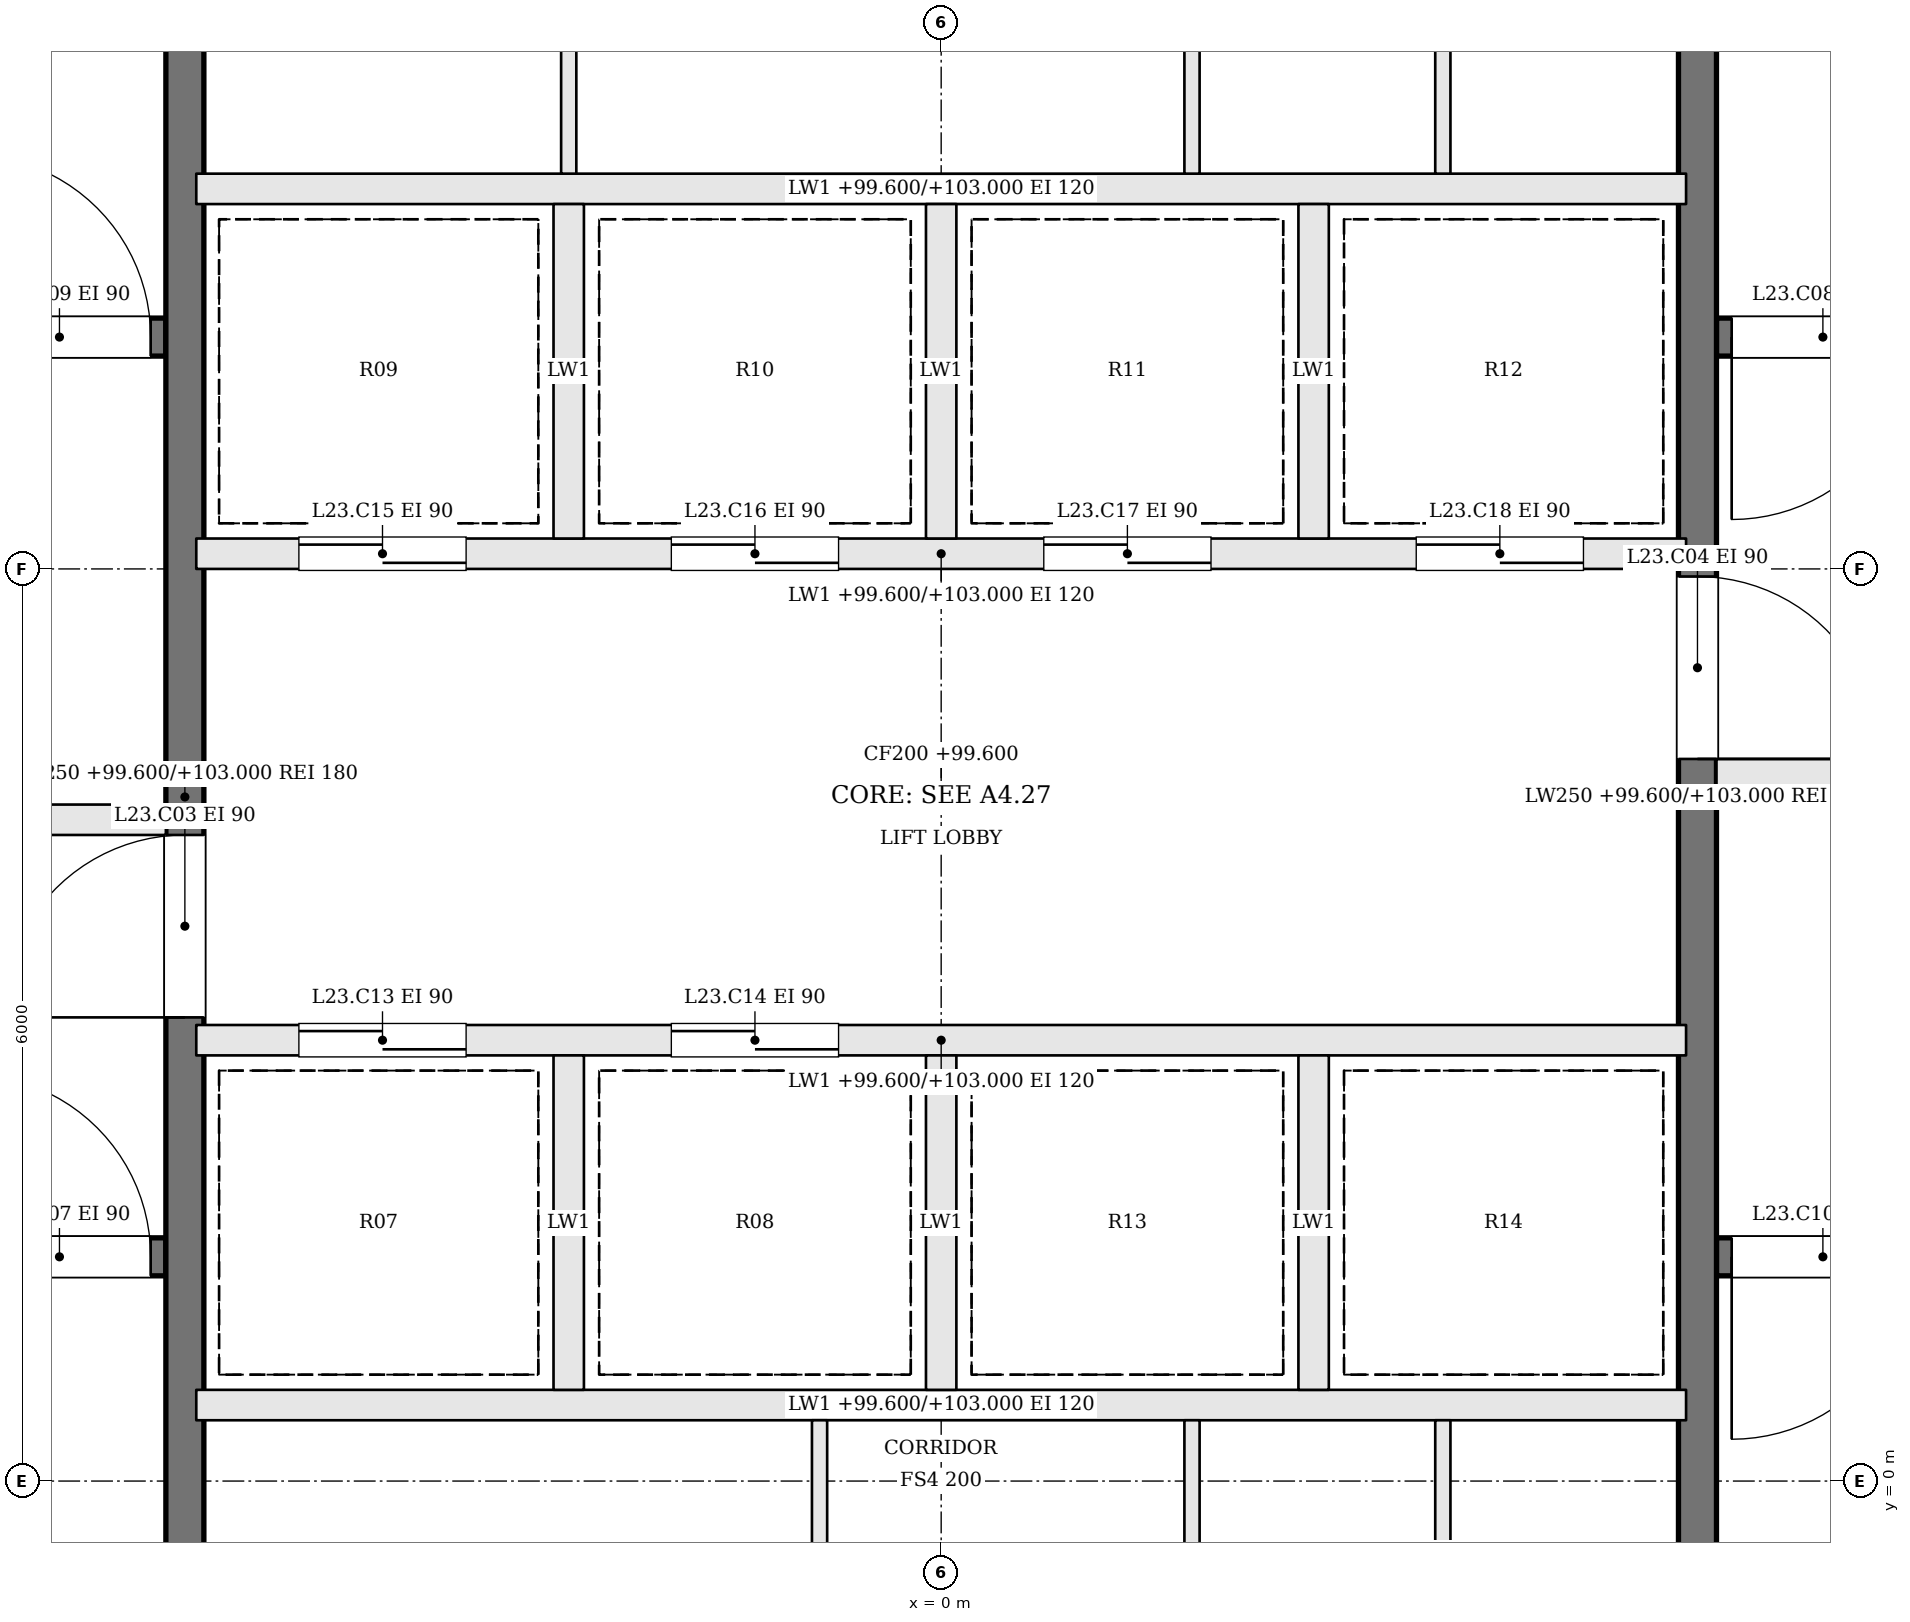
"""IFC4 building model, lengths in metres.
Left out: names, types, materials, properties, quantities, classifications, styles, units other than length and angle.
Written with IfcOpenShell. Run it as: python <this file> out.ifc"""

import sys

from ifc_helpers import new_model, si_unit, direction, frame, frame_2d, origin, place, context, subcontext, project, spatial, rectangle, extrude, element, fill, save


model = new_model("IFC4")
c1 = context("Model", 3, precision=1e-05, world=origin(), true_north=direction((0.0, 1.0)))
c2 = subcontext(c1, "Body", "Model", "MODEL_VIEW")
j1 = project(units=[si_unit("LENGTHUNIT", "METRE"), si_unit("PLANEANGLEUNIT", "RADIAN")], contexts=[c1])
p1 = place(None, origin())
s1 = spatial("IfcSite", under=j1, at=p1, CompositionType="ELEMENT")
p2 = place(p1, origin())
s2 = spatial("IfcBuilding", under=s1, at=p2, CompositionType="ELEMENT")
p3 = place(p2, frame((0.0, 0.0, 99.6)))
s3 = spatial("IfcBuildingStorey", under=s2, at=p3, CompositionType="ELEMENT", Elevation=99.6)
p4 = place(p3, frame((-11.9, 1.475, 0.0), z_axis=(0.0, 0.0, 1.0), x_axis=(1.0, 0.0, 0.0)))
e1 = element("IfcWall", 1, at=p4, inside=s3, PredefinedType="SOLIDWALL", context=c2, shape_type="SweptSolid", body=[
    extrude(rectangle(XDim=6.8, YDim=0.25, at=frame_2d((3.4, 0.0))), origin(), (0.0, 0.0, 1.0), 3.4),
])
p5 = place(p4, frame((5.5, 0.0, 0.0)))
e2 = element("IfcOpeningElement", 2, at=p5, cuts=e1, PredefinedType="OPENING", context=c2, shape_type="SweptSolid", body=[
    extrude(rectangle(XDim=1.2, YDim=2.1, at=frame_2d((0.6, 1.05))), frame((0.0, 0.135, 0.0), z_axis=(0.0, -1.0, 0.0), x_axis=(1.0, 0.0, 0.0)), (0.0, 0.0, 1.0), 0.27),
])
p6 = place(p3, frame((11.9, 7.525, 0.0), z_axis=(0.0, 0.0, 1.0), x_axis=(-1.0, 0.0, 0.0)))
e3 = element("IfcWall", 3, at=p6, inside=s3, PredefinedType="SOLIDWALL", context=c2, shape_type="SweptSolid", body=[
    extrude(rectangle(XDim=6.8, YDim=0.25, at=frame_2d((3.4, 0.0))), origin(), (0.0, 0.0, 1.0), 3.4),
])
p7 = place(p6, frame((5.5, 0.0, 0.0)))
e4 = element("IfcOpeningElement", 4, at=p7, cuts=e3, PredefinedType="OPENING", context=c2, shape_type="SweptSolid", body=[
    extrude(rectangle(XDim=1.2, YDim=2.1, at=frame_2d((0.6, 1.05))), frame((0.0, 0.135, 0.0), z_axis=(0.0, -1.0, 0.0), x_axis=(1.0, 0.0, 0.0)), (0.0, 0.0, 1.0), 0.27),
])
p8 = place(p3, frame((-11.9, 4.35, 0.0), z_axis=(0.0, 0.0, 1.0), x_axis=(1.0, 0.0, 0.0)))
e5 = element("IfcWall", 5, at=p8, inside=s3, PredefinedType="SOLIDWALL", context=c2, shape_type="SweptSolid", body=[
    extrude(rectangle(XDim=6.8, YDim=0.2, at=frame_2d((3.4, 0.0))), origin(), (0.0, 0.0, 1.0), 3.4),
])
p9 = place(p8, frame((4.1, 0.0, 0.0)))
e6 = element("IfcOpeningElement", 6, at=p9, cuts=e5, PredefinedType="OPENING", context=c2, shape_type="SweptSolid", body=[
    extrude(rectangle(XDim=1.2, YDim=2.1, at=frame_2d((0.6, 1.05))), frame((0.0, 0.11, 0.0), z_axis=(0.0, -1.0, 0.0), x_axis=(1.0, 0.0, 0.0)), (0.0, 0.0, 1.0), 0.22),
])
p10 = place(p8, frame((0.8, 0.0, 0.0)))
e7 = element("IfcOpeningElement", 7, at=p10, cuts=e5, PredefinedType="OPENING", context=c2, shape_type="SweptSolid", body=[
    extrude(rectangle(XDim=1.2, YDim=2.1, at=frame_2d((0.6, 1.05))), frame((0.0, 0.11, 0.0), z_axis=(0.0, -1.0, 0.0), x_axis=(1.0, 0.0, 0.0)), (0.0, 0.0, 1.0), 0.22),
])
p11 = place(p3, frame((11.9, 4.65, 0.0), z_axis=(0.0, 0.0, 1.0), x_axis=(-1.0, 0.0, 0.0)))
e8 = element("IfcWall", 8, at=p11, inside=s3, PredefinedType="SOLIDWALL", context=c2, shape_type="SweptSolid", body=[
    extrude(rectangle(XDim=6.8, YDim=0.2, at=frame_2d((3.4, 0.0))), origin(), (0.0, 0.0, 1.0), 3.4),
])
p12 = place(p11, frame((4.1, 0.0, 0.0)))
e9 = element("IfcOpeningElement", 9, at=p12, cuts=e8, PredefinedType="OPENING", context=c2, shape_type="SweptSolid", body=[
    extrude(rectangle(XDim=1.2, YDim=2.1, at=frame_2d((0.6, 1.05))), frame((0.0, 0.11, 0.0), z_axis=(0.0, -1.0, 0.0), x_axis=(1.0, 0.0, 0.0)), (0.0, 0.0, 1.0), 0.22),
])
p13 = place(p11, frame((0.8, 0.0, 0.0)))
e10 = element("IfcOpeningElement", 10, at=p13, cuts=e8, PredefinedType="OPENING", context=c2, shape_type="SweptSolid", body=[
    extrude(rectangle(XDim=1.2, YDim=2.1, at=frame_2d((0.6, 1.05))), frame((0.0, 0.11, 0.0), z_axis=(0.0, -1.0, 0.0), x_axis=(1.0, 0.0, 0.0)), (0.0, 0.0, 1.0), 0.22),
])
p14 = place(p3, frame((-11.9, 7.525, 0.0), z_axis=(0.0, 0.0, 1.0), x_axis=(1.0, 0.0, 0.0)))
e11 = element("IfcWall", 11, at=p14, inside=s3, PredefinedType="SOLIDWALL", context=c2, shape_type="SweptSolid", body=[
    extrude(rectangle(XDim=6.8, YDim=0.25, at=frame_2d((3.4, 0.0))), origin(), (0.0, 0.0, 1.0), 3.4),
])
p15 = place(p14, frame((5.5, 0.0, 0.0)))
e12 = element("IfcOpeningElement", 12, at=p15, cuts=e11, PredefinedType="OPENING", context=c2, shape_type="SweptSolid", body=[
    extrude(rectangle(XDim=1.2, YDim=2.1, at=frame_2d((0.6, 1.05))), frame((0.0, 0.135, 0.0), z_axis=(0.0, -1.0, 0.0), x_axis=(1.0, 0.0, 0.0)), (0.0, 0.0, 1.0), 0.27),
])
p16 = place(p3, frame((11.9, 1.475, 0.0), z_axis=(0.0, 0.0, 1.0), x_axis=(-1.0, 0.0, 0.0)))
e13 = element("IfcWall", 13, at=p16, inside=s3, PredefinedType="SOLIDWALL", context=c2, shape_type="SweptSolid", body=[
    extrude(rectangle(XDim=6.8, YDim=0.25, at=frame_2d((3.4, 0.0))), origin(), (0.0, 0.0, 1.0), 3.4),
])
p17 = place(p16, frame((5.5, 0.0, 0.0)))
e14 = element("IfcOpeningElement", 14, at=p17, cuts=e13, PredefinedType="OPENING", context=c2, shape_type="SweptSolid", body=[
    extrude(rectangle(XDim=1.2, YDim=2.1, at=frame_2d((0.6, 1.05))), frame((0.0, 0.135, 0.0), z_axis=(0.0, -1.0, 0.0), x_axis=(1.0, 0.0, 0.0)), (0.0, 0.0, 1.0), 0.27),
])
p18 = place(p3, frame((-4.975, -1.9, 0.0), z_axis=(0.0, 0.0, 1.0), x_axis=(0.0, 1.0, 0.0)))
e15 = element("IfcWall", 15, at=p18, inside=s3, PredefinedType="SOLIDWALL", context=c2, shape_type="SweptSolid", body=[
    extrude(rectangle(XDim=12.8, YDim=0.25, at=frame_2d((6.4, 0.0))), origin(), (0.0, 0.0, 1.0), 3.4),
])
p19 = place(p18, frame((4.95, 0.0, 0.0)))
e16 = element("IfcOpeningElement", 16, at=p19, cuts=e15, PredefinedType="OPENING", context=c2, shape_type="SweptSolid", body=[
    extrude(rectangle(XDim=1.2, YDim=2.1, at=frame_2d((0.6, 1.05))), frame((0.0, 0.135, 0.0), z_axis=(0.0, -1.0, 0.0), x_axis=(1.0, 0.0, 0.0)), (0.0, 0.0, 1.0), 0.27),
])
p20 = place(p3, frame((4.975, 10.9, 0.0), z_axis=(0.0, 0.0, 1.0), x_axis=(0.0, -1.0, 0.0)))
e17 = element("IfcWall", 17, at=p20, inside=s3, PredefinedType="SOLIDWALL", context=c2, shape_type="SweptSolid", body=[
    extrude(rectangle(XDim=12.8, YDim=0.25, at=frame_2d((6.4, 0.0))), origin(), (0.0, 0.0, 1.0), 3.4),
])
p21 = place(p20, frame((4.95, 0.0, 0.0)))
e18 = element("IfcOpeningElement", 18, at=p21, cuts=e17, PredefinedType="OPENING", context=c2, shape_type="SweptSolid", body=[
    extrude(rectangle(XDim=1.2, YDim=2.1, at=frame_2d((0.6, 1.05))), frame((0.0, 0.135, 0.0), z_axis=(0.0, -1.0, 0.0), x_axis=(1.0, 0.0, 0.0)), (0.0, 0.0, 1.0), 0.27),
])
p22 = place(p3, frame((-4.9, 0.5, 0.0), z_axis=(0.0, 0.0, 1.0), x_axis=(1.0, 0.0, 0.0)))
e19 = element("IfcWall", 19, at=p22, inside=s3, PredefinedType="SOLIDWALL", context=c2, shape_type="SweptSolid", body=[
    extrude(rectangle(XDim=9.8, YDim=0.2, at=frame_2d((4.9, 0.0))), origin(), (0.0, 0.0, 1.0), 3.4),
])
p23 = place(p3, frame((-4.9, 2.9, 0.0), z_axis=(0.0, 0.0, 1.0), x_axis=(1.0, 0.0, 0.0)))
e20 = element("IfcWall", 20, at=p23, inside=s3, PredefinedType="SOLIDWALL", context=c2, shape_type="SweptSolid", body=[
    extrude(rectangle(XDim=9.8, YDim=0.2, at=frame_2d((4.9, 0.0))), origin(), (0.0, 0.0, 1.0), 3.4),
])
p24 = place(p23, frame((0.675, 0.0, 0.0)))
e21 = element("IfcOpeningElement", 21, at=p24, cuts=e20, PredefinedType="OPENING", context=c2, shape_type="SweptSolid", body=[
    extrude(rectangle(XDim=1.1, YDim=2.1, at=frame_2d((0.55, 1.05))), frame((0.0, 0.11, 0.0), z_axis=(0.0, -1.0, 0.0), x_axis=(1.0, 0.0, 0.0)), (0.0, 0.0, 1.0), 0.22),
])
p25 = place(p23, frame((3.125, 0.0, 0.0)))
e22 = element("IfcOpeningElement", 22, at=p25, cuts=e20, PredefinedType="OPENING", context=c2, shape_type="SweptSolid", body=[
    extrude(rectangle(XDim=1.1, YDim=2.1, at=frame_2d((0.55, 1.05))), frame((0.0, 0.11, 0.0), z_axis=(0.0, -1.0, 0.0), x_axis=(1.0, 0.0, 0.0)), (0.0, 0.0, 1.0), 0.22),
])
p26 = place(p3, frame((-4.9, 6.1, 0.0), z_axis=(0.0, 0.0, 1.0), x_axis=(1.0, 0.0, 0.0)))
e23 = element("IfcWall", 23, at=p26, inside=s3, PredefinedType="SOLIDWALL", context=c2, shape_type="SweptSolid", body=[
    extrude(rectangle(XDim=9.8, YDim=0.2, at=frame_2d((4.9, 0.0))), origin(), (0.0, 0.0, 1.0), 3.4),
])
p27 = place(p26, frame((0.675, 0.0, 0.0)))
e24 = element("IfcOpeningElement", 24, at=p27, cuts=e23, PredefinedType="OPENING", context=c2, shape_type="SweptSolid", body=[
    extrude(rectangle(XDim=1.1, YDim=2.1, at=frame_2d((0.55, 1.05))), frame((0.0, 0.11, 0.0), z_axis=(0.0, -1.0, 0.0), x_axis=(1.0, 0.0, 0.0)), (0.0, 0.0, 1.0), 0.22),
])
p28 = place(p26, frame((3.125, 0.0, 0.0)))
e25 = element("IfcOpeningElement", 25, at=p28, cuts=e23, PredefinedType="OPENING", context=c2, shape_type="SweptSolid", body=[
    extrude(rectangle(XDim=1.1, YDim=2.1, at=frame_2d((0.55, 1.05))), frame((0.0, 0.11, 0.0), z_axis=(0.0, -1.0, 0.0), x_axis=(1.0, 0.0, 0.0)), (0.0, 0.0, 1.0), 0.22),
])
p29 = place(p26, frame((5.575, 0.0, 0.0)))
e26 = element("IfcOpeningElement", 26, at=p29, cuts=e23, PredefinedType="OPENING", context=c2, shape_type="SweptSolid", body=[
    extrude(rectangle(XDim=1.1, YDim=2.1, at=frame_2d((0.55, 1.05))), frame((0.0, 0.11, 0.0), z_axis=(0.0, -1.0, 0.0), x_axis=(1.0, 0.0, 0.0)), (0.0, 0.0, 1.0), 0.22),
])
p30 = place(p26, frame((8.025, 0.0, 0.0)))
e27 = element("IfcOpeningElement", 27, at=p30, cuts=e23, PredefinedType="OPENING", context=c2, shape_type="SweptSolid", body=[
    extrude(rectangle(XDim=1.1, YDim=2.1, at=frame_2d((0.55, 1.05))), frame((0.0, 0.11, 0.0), z_axis=(0.0, -1.0, 0.0), x_axis=(1.0, 0.0, 0.0)), (0.0, 0.0, 1.0), 0.22),
])
p31 = place(p3, frame((-4.9, 8.5, 0.0), z_axis=(0.0, 0.0, 1.0), x_axis=(1.0, 0.0, 0.0)))
e28 = element("IfcWall", 28, at=p31, inside=s3, PredefinedType="SOLIDWALL", context=c2, shape_type="SweptSolid", body=[
    extrude(rectangle(XDim=9.8, YDim=0.2, at=frame_2d((4.9, 0.0))), origin(), (0.0, 0.0, 1.0), 3.4),
])
for number, where, z_axis, x_axis in (
    (29, (-2.45, 0.6, 0.0), (0.0, 0.0, 1.0), (0.0, 1.0, 0.0)),
    (30, (0.0, 0.6, 0.0), (0.0, 0.0, 1.0), (0.0, 1.0, 0.0)),
    (31, (2.45, 0.6, 0.0), (0.0, 0.0, 1.0), (0.0, 1.0, 0.0)),
    (32, (-2.45, 6.2, 0.0), (0.0, 0.0, 1.0), (0.0, 1.0, 0.0)),
    (33, (0.0, 6.2, 0.0), (0.0, 0.0, 1.0), (0.0, 1.0, 0.0)),
    (34, (2.45, 6.2, 0.0), (0.0, 0.0, 1.0), (0.0, 1.0, 0.0)),
):
    element("IfcWall", number, at=place(p3, frame(where, z_axis=z_axis, x_axis=x_axis)), inside=s3, PredefinedType="SOLIDWALL", context=c2, shape_type="SweptSolid", body=[
        extrude(rectangle(XDim=2.2, YDim=0.2, at=frame_2d((1.1, 0.0))), origin(), (0.0, 0.0, 1.0), 3.4),
    ])
for number, where, z_axis, x_axis in (
    (35, (-0.8, -1.9, 0.0), (0.0, 0.0, 1.0), (0.0, 1.0, 0.0)),
    (36, (1.65, -1.9, 0.0), (0.0, 0.0, 1.0), (0.0, 1.0, 0.0)),
    (37, (3.3, -1.9, 0.0), (0.0, 0.0, 1.0), (0.0, 1.0, 0.0)),
    (38, (-2.45, 8.6, 0.0), (0.0, 0.0, 1.0), (0.0, 1.0, 0.0)),
    (39, (1.65, 8.6, 0.0), (0.0, 0.0, 1.0), (0.0, 1.0, 0.0)),
    (40, (3.3, 8.6, 0.0), (0.0, 0.0, 1.0), (0.0, 1.0, 0.0)),
):
    element("IfcWall", number, at=place(p3, frame(where, z_axis=z_axis, x_axis=x_axis)), inside=s3, PredefinedType="PARTITIONING", context=c2, shape_type="SweptSolid", body=[
        extrude(rectangle(XDim=2.3, YDim=0.1, at=frame_2d((1.15, 0.0))), origin(), (0.0, 0.0, 1.0), 3.4),
    ])
p32 = place(p19, origin())
e41 = element("IfcDoor", 41, at=p32, inside=s3, OperationType="SINGLE_SWING_LEFT", PredefinedType="DOOR", context=c2, shape_type="SweptSolid", body=[
    extrude(rectangle(XDim=1.2, YDim=2.1, at=frame_2d((0.6, 1.05))), frame((0.0, 0.025, 0.0), z_axis=(0.0, -1.0, 0.0), x_axis=(1.0, 0.0, 0.0)), (0.0, 0.0, 1.0), 0.05),
])
fill(e16, e41)
p33 = place(p21, origin())
e42 = element("IfcDoor", 42, at=p33, inside=s3, OperationType="SINGLE_SWING_RIGHT", PredefinedType="DOOR", context=c2, shape_type="SweptSolid", body=[
    extrude(rectangle(XDim=1.2, YDim=2.1, at=frame_2d((0.6, 1.05))), frame((0.0, 0.025, 0.0), z_axis=(0.0, -1.0, 0.0), x_axis=(1.0, 0.0, 0.0)), (0.0, 0.0, 1.0), 0.05),
])
fill(e18, e42)
p34 = place(p5, origin())
e43 = element("IfcDoor", 43, at=p34, inside=s3, OperationType="SINGLE_SWING_LEFT", PredefinedType="DOOR", context=c2, shape_type="SweptSolid", body=[
    extrude(rectangle(XDim=1.2, YDim=2.1, at=frame_2d((0.6, 1.05))), frame((0.0, 0.025, 0.0), z_axis=(0.0, -1.0, 0.0), x_axis=(1.0, 0.0, 0.0)), (0.0, 0.0, 1.0), 0.05),
])
fill(e2, e43)
p35 = place(p7, origin())
e44 = element("IfcDoor", 44, at=p35, inside=s3, OperationType="SINGLE_SWING_RIGHT", PredefinedType="DOOR", context=c2, shape_type="SweptSolid", body=[
    extrude(rectangle(XDim=1.2, YDim=2.1, at=frame_2d((0.6, 1.05))), frame((0.0, 0.025, 0.0), z_axis=(0.0, -1.0, 0.0), x_axis=(1.0, 0.0, 0.0)), (0.0, 0.0, 1.0), 0.05),
])
fill(e4, e44)
p36 = place(p15, origin())
e45 = element("IfcDoor", 45, at=p36, inside=s3, OperationType="SINGLE_SWING_LEFT", PredefinedType="DOOR", context=c2, shape_type="SweptSolid", body=[
    extrude(rectangle(XDim=1.2, YDim=2.1, at=frame_2d((0.6, 1.05))), frame((0.0, 0.025, 0.0), z_axis=(0.0, -1.0, 0.0), x_axis=(1.0, 0.0, 0.0)), (0.0, 0.0, 1.0), 0.05),
])
fill(e12, e45)
p37 = place(p17, origin())
e46 = element("IfcDoor", 46, at=p37, inside=s3, OperationType="SINGLE_SWING_RIGHT", PredefinedType="DOOR", context=c2, shape_type="SweptSolid", body=[
    extrude(rectangle(XDim=1.2, YDim=2.1, at=frame_2d((0.6, 1.05))), frame((0.0, 0.025, 0.0), z_axis=(0.0, -1.0, 0.0), x_axis=(1.0, 0.0, 0.0)), (0.0, 0.0, 1.0), 0.05),
])
fill(e14, e46)
p38 = place(p24, origin())
e47 = element("IfcDoor", 47, at=p38, inside=s3, OperationType="SLIDING_TO_RIGHT", PredefinedType="DOOR", context=c2, shape_type="SweptSolid", body=[
    extrude(rectangle(XDim=1.1, YDim=2.1, at=frame_2d((0.55, 1.05))), frame((0.0, 0.025, 0.0), z_axis=(0.0, -1.0, 0.0), x_axis=(1.0, 0.0, 0.0)), (0.0, 0.0, 1.0), 0.05),
])
fill(e21, e47)
p39 = place(p25, origin())
e48 = element("IfcDoor", 48, at=p39, inside=s3, OperationType="SLIDING_TO_LEFT", PredefinedType="DOOR", context=c2, shape_type="SweptSolid", body=[
    extrude(rectangle(XDim=1.1, YDim=2.1, at=frame_2d((0.55, 1.05))), frame((0.0, 0.025, 0.0), z_axis=(0.0, -1.0, 0.0), x_axis=(1.0, 0.0, 0.0)), (0.0, 0.0, 1.0), 0.05),
])
fill(e22, e48)
p40 = place(p27, origin())
e49 = element("IfcDoor", 49, at=p40, inside=s3, OperationType="SLIDING_TO_RIGHT", PredefinedType="DOOR", context=c2, shape_type="SweptSolid", body=[
    extrude(rectangle(XDim=1.1, YDim=2.1, at=frame_2d((0.55, 1.05))), frame((0.0, 0.025, 0.0), z_axis=(0.0, -1.0, 0.0), x_axis=(1.0, 0.0, 0.0)), (0.0, 0.0, 1.0), 0.05),
])
fill(e24, e49)
p41 = place(p28, origin())
e50 = element("IfcDoor", 50, at=p41, inside=s3, OperationType="SLIDING_TO_LEFT", PredefinedType="DOOR", context=c2, shape_type="SweptSolid", body=[
    extrude(rectangle(XDim=1.1, YDim=2.1, at=frame_2d((0.55, 1.05))), frame((0.0, 0.025, 0.0), z_axis=(0.0, -1.0, 0.0), x_axis=(1.0, 0.0, 0.0)), (0.0, 0.0, 1.0), 0.05),
])
fill(e25, e50)
p42 = place(p29, origin())
e51 = element("IfcDoor", 51, at=p42, inside=s3, OperationType="SLIDING_TO_RIGHT", PredefinedType="DOOR", context=c2, shape_type="SweptSolid", body=[
    extrude(rectangle(XDim=1.1, YDim=2.1, at=frame_2d((0.55, 1.05))), frame((0.0, 0.025, 0.0), z_axis=(0.0, -1.0, 0.0), x_axis=(1.0, 0.0, 0.0)), (0.0, 0.0, 1.0), 0.05),
])
fill(e26, e51)
p43 = place(p30, origin())
e52 = element("IfcDoor", 52, at=p43, inside=s3, OperationType="SLIDING_TO_LEFT", PredefinedType="DOOR", context=c2, shape_type="SweptSolid", body=[
    extrude(rectangle(XDim=1.1, YDim=2.1, at=frame_2d((0.55, 1.05))), frame((0.0, 0.025, 0.0), z_axis=(0.0, -1.0, 0.0), x_axis=(1.0, 0.0, 0.0)), (0.0, 0.0, 1.0), 0.05),
])
fill(e27, e52)
save(model, sys.argv[1])
